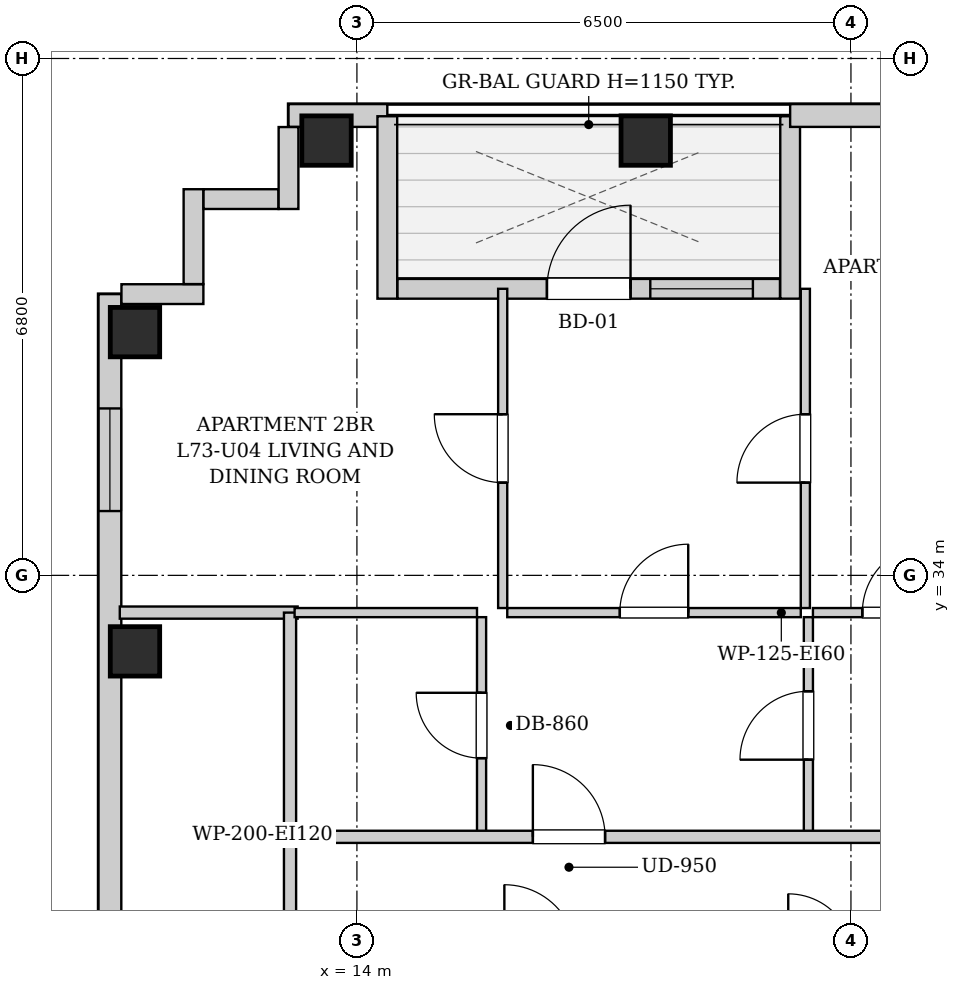
"""IFC4 building model, lengths in metres.
Left out: names, types, materials, properties, quantities, classifications, styles, units other than length and angle.
Written with IfcOpenShell. Run it as: python <this file> out.ifc"""

import sys

from ifc_helpers import new_model, si_unit, direction, frame, frame_2d, origin, origin_2d, place, context, subcontext, project, spatial, rectangle, extrude, element, fill, save


model = new_model("IFC4")
c1 = context("Model", 3, precision=1e-05, world=origin(), true_north=direction((0.0, 1.0)))
c2 = subcontext(c1, "Body", "Model", "MODEL_VIEW")
j1 = project(units=[si_unit("LENGTHUNIT", "METRE"), si_unit("PLANEANGLEUNIT", "RADIAN")], contexts=[c1])
p1 = place(None, origin())
s1 = spatial("IfcSite", under=j1, at=p1, CompositionType="ELEMENT")
p2 = place(p1, origin())
s2 = spatial("IfcBuilding", under=s1, at=p2, CompositionType="ELEMENT")
p3 = place(p2, frame((0.0, 0.0, 251.3)))
s3 = spatial("IfcBuildingStorey", under=s2, at=p3, CompositionType="ELEMENT", Elevation=251.3)
for number, where, z_axis, x_axis in (
    (1, (13.6, 39.72, 0.0), (0.0, 0.0, 1.0), (1.0, 0.0, 0.0)),
    (2, (17.8, 39.72, 0.0), (0.0, 0.0, 1.0), (1.0, 0.0, 0.0)),
    (3, (11.08, 33.0, 0.0), (0.0, 0.0, 1.0), (1.0, 0.0, 0.0)),
    (4, (11.08, 37.2, 0.0), (0.0, 0.0, 1.0), (1.0, 0.0, 0.0)),
):
    element("IfcColumn", number, at=place(p3, frame(where, z_axis=z_axis, x_axis=x_axis)), inside=s3, PredefinedType="COLUMN", context=c2, shape_type="SweptSolid", body=[
        extrude(rectangle(XDim=0.65, YDim=0.65, at=origin_2d()), origin(), (0.0, 0.0, 1.0), 3.4),
    ])
p4 = place(p3, frame((13.1, 40.05, 0.0), z_axis=(0.0, 0.0, 1.0), x_axis=(1.0, 0.0, 0.0)))
e5 = element("IfcWall", 5, at=p4, inside=s3, PredefinedType="SOLIDWALL", context=c2, shape_type="SweptSolid", body=[
    extrude(rectangle(XDim=1.3, YDim=0.3, at=frame_2d((0.65, 0.0))), origin(), (0.0, 0.0, 1.0), 3.14),
])
p5 = place(p3, frame((14.4, 40.04, 0.0), z_axis=(0.0, 0.0, 1.0), x_axis=(0.0, -1.0, 0.0)))
e6 = element("IfcWall", 6, at=p5, inside=s3, PredefinedType="SOLIDWALL", context=c2, shape_type="SweptSolid", body=[
    extrude(rectangle(XDim=2.4, YDim=0.26, at=frame_2d((1.2, 0.0))), origin(), (0.0, 0.0, 1.0), 3.14),
])
p6 = place(p3, frame((14.534, 37.77, 0.0), z_axis=(0.0, 0.0, 1.0), x_axis=(1.0, 0.0, 0.0)))
e7 = element("IfcWall", 7, at=p6, inside=s3, PredefinedType="SOLIDWALL", context=c2, shape_type="SweptSolid", body=[
    extrude(rectangle(XDim=5.032, YDim=0.26, at=frame_2d((2.516, 0.0))), origin(), (0.0, 0.0, 1.0), 3.14),
])
p7 = place(p6, frame((1.966, 0.0, 0.0)))
e8 = element("IfcOpeningElement", 8, at=p7, cuts=e7, PredefinedType="OPENING", context=c2, shape_type="SweptSolid", body=[
    extrude(rectangle(XDim=1.1, YDim=2.0, at=frame_2d((0.55, 1.0))), frame((0.0, 0.14, 0.0), z_axis=(0.0, -1.0, 0.0), x_axis=(1.0, 0.0, 0.0)), (0.0, 0.0, 1.0), 0.28),
])
p8 = place(p6, frame((3.326, 0.0, 0.55)))
e9 = element("IfcOpeningElement", 9, at=p8, cuts=e7, PredefinedType="OPENING", context=c2, shape_type="SweptSolid", body=[
    extrude(rectangle(XDim=1.35, YDim=1.2, at=frame_2d((0.675, 0.6))), frame((0.0, 0.14, 0.0), z_axis=(0.0, -1.0, 0.0), x_axis=(1.0, 0.0, 0.0)), (0.0, 0.0, 1.0), 0.28),
])
p9 = place(p3, frame((19.7, 37.64, 0.0), z_axis=(0.0, 0.0, 1.0), x_axis=(0.0, 1.0, 0.0)))
e10 = element("IfcWall", 10, at=p9, inside=s3, PredefinedType="SOLIDWALL", context=c2, shape_type="SweptSolid", body=[
    extrude(rectangle(XDim=2.4, YDim=0.26, at=frame_2d((1.2, 0.0))), origin(), (0.0, 0.0, 1.0), 3.14),
])
p10 = place(p3, frame((19.7, 40.05, 0.0), z_axis=(0.0, 0.0, 1.0), x_axis=(1.0, 0.0, 0.0)))
e11 = element("IfcWall", 11, at=p10, inside=s3, PredefinedType="SOLIDWALL", context=c2, shape_type="SweptSolid", body=[
    extrude(rectangle(XDim=10.25, YDim=0.3, at=frame_2d((5.125, 0.0))), origin(), (0.0, 0.0, 1.0), 3.14),
])
p11 = place(p10, frame((1.45, 0.0, 0.55)))
e12 = element("IfcOpeningElement", 12, at=p11, cuts=e11, PredefinedType="OPENING", context=c2, shape_type="SweptSolid", body=[
    extrude(rectangle(XDim=1.35, YDim=1.2, at=frame_2d((0.675, 0.6))), frame((0.0, 0.16, 0.0), z_axis=(0.0, -1.0, 0.0), x_axis=(1.0, 0.0, 0.0)), (0.0, 0.0, 1.0), 0.32),
])
p12 = place(p10, frame((7.8, 0.0, 0.55)))
e13 = element("IfcOpeningElement", 13, at=p12, cuts=e11, PredefinedType="OPENING", context=c2, shape_type="SweptSolid", body=[
    extrude(rectangle(XDim=1.35, YDim=1.2, at=frame_2d((0.675, 0.6))), frame((0.0, 0.16, 0.0), z_axis=(0.0, -1.0, 0.0), x_axis=(1.0, 0.0, 0.0)), (0.0, 0.0, 1.0), 0.32),
])
p13 = place(p3, frame((10.75, 6.3, 0.0), z_axis=(0.0, 0.0, 1.0), x_axis=(0.0, 1.0, 0.0)))
e14 = element("IfcWall", 14, at=p13, inside=s3, PredefinedType="SOLIDWALL", context=c2, shape_type="SweptSolid", body=[
    extrude(rectangle(XDim=31.4, YDim=0.3, at=frame_2d((15.7, 0.0))), origin(), (0.0, 0.0, 1.0), 3.14),
])
p14 = place(p13, frame((28.546, 0.0, 0.55)))
e15 = element("IfcOpeningElement", 15, at=p14, cuts=e14, PredefinedType="OPENING", context=c2, shape_type="SweptSolid", body=[
    extrude(rectangle(XDim=1.35, YDim=1.2, at=frame_2d((0.675, 0.6))), frame((0.0, 0.16, 0.0), z_axis=(0.0, -1.0, 0.0), x_axis=(1.0, 0.0, 0.0)), (0.0, 0.0, 1.0), 0.32),
])
p15 = place(p13, frame((11.85, 0.0, 0.55)))
e16 = element("IfcOpeningElement", 16, at=p15, cuts=e14, PredefinedType="OPENING", context=c2, shape_type="SweptSolid", body=[
    extrude(rectangle(XDim=1.35, YDim=1.2, at=frame_2d((0.675, 0.6))), frame((0.0, 0.16, 0.0), z_axis=(0.0, -1.0, 0.0), x_axis=(1.0, 0.0, 0.0)), (0.0, 0.0, 1.0), 0.32),
])
p16 = place(p13, frame((9.185, 0.0, 0.55)))
e17 = element("IfcOpeningElement", 17, at=p16, cuts=e14, PredefinedType="OPENING", context=c2, shape_type="SweptSolid", body=[
    extrude(rectangle(XDim=1.35, YDim=1.2, at=frame_2d((0.675, 0.6))), frame((0.0, 0.16, 0.0), z_axis=(0.0, -1.0, 0.0), x_axis=(1.0, 0.0, 0.0)), (0.0, 0.0, 1.0), 0.32),
])
p17 = place(p13, frame((19.006, 0.0, 0.55)))
e18 = element("IfcOpeningElement", 18, at=p17, cuts=e14, PredefinedType="OPENING", context=c2, shape_type="SweptSolid", body=[
    extrude(rectangle(XDim=1.35, YDim=1.2, at=frame_2d((0.675, 0.6))), frame((0.0, 0.16, 0.0), z_axis=(0.0, -1.0, 0.0), x_axis=(1.0, 0.0, 0.0)), (0.0, 0.0, 1.0), 0.32),
])
p18 = place(p13, frame((20.616, 0.0, 0.55)))
e19 = element("IfcOpeningElement", 19, at=p18, cuts=e14, PredefinedType="OPENING", context=c2, shape_type="SweptSolid", body=[
    extrude(rectangle(XDim=1.35, YDim=1.2, at=frame_2d((0.675, 0.6))), frame((0.0, 0.16, 0.0), z_axis=(0.0, -1.0, 0.0), x_axis=(1.0, 0.0, 0.0)), (0.0, 0.0, 1.0), 0.32),
])
p19 = place(p3, frame((10.902, 37.7, 0.0), z_axis=(0.0, 0.0, 1.0), x_axis=(1.0, 0.0, 0.0)))
e20 = element("IfcWall", 20, at=p19, inside=s3, PredefinedType="SOLIDWALL", context=c2, shape_type="SweptSolid", body=[
    extrude(rectangle(XDim=1.078, YDim=0.26, at=frame_2d((0.539, 0.0))), origin(), (0.0, 0.0, 1.0), 3.14),
])
p20 = place(p3, frame((11.85, 37.832, 0.0), z_axis=(0.0, 0.0, 1.0), x_axis=(0.0, 1.0, 0.0)))
e21 = element("IfcWall", 21, at=p20, inside=s3, PredefinedType="SOLIDWALL", context=c2, shape_type="SweptSolid", body=[
    extrude(rectangle(XDim=1.248, YDim=0.26, at=frame_2d((0.624, 0.0))), origin(), (0.0, 0.0, 1.0), 3.14),
])
p21 = place(p3, frame((11.982, 38.95, 0.0), z_axis=(0.0, 0.0, 1.0), x_axis=(1.0, 0.0, 0.0)))
e22 = element("IfcWall", 22, at=p21, inside=s3, PredefinedType="SOLIDWALL", context=c2, shape_type="SweptSolid", body=[
    extrude(rectangle(XDim=0.986, YDim=0.26, at=frame_2d((0.493, 0.0))), origin(), (0.0, 0.0, 1.0), 3.14),
])
p22 = place(p3, frame((13.1, 38.82, 0.0), z_axis=(0.0, 0.0, 1.0), x_axis=(0.0, 1.0, 0.0)))
e23 = element("IfcWall", 23, at=p22, inside=s3, PredefinedType="SOLIDWALL", context=c2, shape_type="SweptSolid", body=[
    extrude(rectangle(XDim=1.078, YDim=0.26, at=frame_2d((0.539, 0.0))), origin(), (0.0, 0.0, 1.0), 3.14),
])
p23 = place(p3, frame((13.12, 28.98, 0.0), z_axis=(0.0, 0.0, 1.0), x_axis=(0.0, 1.0, 0.0)))
e24 = element("IfcWall", 24, at=p23, inside=s3, PredefinedType="PARTITIONING", context=c2, shape_type="SweptSolid", body=[
    extrude(rectangle(XDim=1.58, YDim=0.16, at=frame_2d((0.79, 0.0))), origin(), (0.0, 0.0, 1.0), 3.14),
])
p24 = place(p3, frame((10.88, 33.51, 0.0), z_axis=(0.0, 0.0, 1.0), x_axis=(1.0, 0.0, 0.0)))
e25 = element("IfcWall", 25, at=p24, inside=s3, PredefinedType="PARTITIONING", context=c2, shape_type="SweptSolid", body=[
    extrude(rectangle(XDim=2.34, YDim=0.16, at=frame_2d((1.17, 0.0))), origin(), (0.0, 0.0, 1.0), 3.14),
])
p25 = place(p3, frame((13.12, 30.6, 0.0), z_axis=(0.0, 0.0, 1.0), x_axis=(0.0, 1.0, 0.0)))
e26 = element("IfcWall", 26, at=p25, inside=s3, PredefinedType="PARTITIONING", context=c2, shape_type="SweptSolid", body=[
    extrude(rectangle(XDim=2.91, YDim=0.16, at=frame_2d((1.455, 0.0))), origin(), (0.0, 0.0, 1.0), 3.14),
])
p26 = place(p3, frame((15.64, 30.6, 0.0), z_axis=(0.0, 0.0, 1.0), x_axis=(0.0, 1.0, 0.0)))
e27 = element("IfcWall", 27, at=p26, inside=s3, PredefinedType="PARTITIONING", context=c2, shape_type="SweptSolid", body=[
    extrude(rectangle(XDim=2.85, YDim=0.12, at=frame_2d((1.425, 0.0))), origin(), (0.0, 0.0, 1.0), 3.14),
])
p27 = place(p26, frame((0.995, 0.0, 0.0)))
e28 = element("IfcOpeningElement", 28, at=p27, cuts=e27, PredefinedType="OPENING", context=c2, shape_type="SweptSolid", body=[
    extrude(rectangle(XDim=0.86, YDim=2.05, at=frame_2d((0.43, 1.025))), frame((0.0, 0.07, 0.0), z_axis=(0.0, -1.0, 0.0), x_axis=(1.0, 0.0, 0.0)), (0.0, 0.0, 1.0), 0.14),
])
p28 = place(p3, frame((13.18, 33.51, 0.0), z_axis=(0.0, 0.0, 1.0), x_axis=(1.0, 0.0, 0.0)))
e29 = element("IfcWall", 29, at=p28, inside=s3, PredefinedType="PARTITIONING", context=c2, shape_type="SweptSolid", body=[
    extrude(rectangle(XDim=2.4, YDim=0.12, at=frame_2d((1.2, 0.0))), origin(), (0.0, 0.0, 1.0), 3.14),
])
p29 = place(p3, frame((19.94, 30.6, 0.0), z_axis=(0.0, 0.0, 1.0), x_axis=(0.0, 1.0, 0.0)))
e30 = element("IfcWall", 30, at=p29, inside=s3, PredefinedType="PARTITIONING", context=c2, shape_type="SweptSolid", body=[
    extrude(rectangle(XDim=2.85, YDim=0.12, at=frame_2d((1.425, 0.0))), origin(), (0.0, 0.0, 1.0), 3.14),
])
p30 = place(p29, frame((0.975, 0.0, 0.0)))
e31 = element("IfcOpeningElement", 31, at=p30, cuts=e30, PredefinedType="OPENING", context=c2, shape_type="SweptSolid", body=[
    extrude(rectangle(XDim=0.9, YDim=2.05, at=frame_2d((0.45, 1.025))), frame((0.0, 0.07, 0.0), z_axis=(0.0, -1.0, 0.0), x_axis=(1.0, 0.0, 0.0)), (0.0, 0.0, 1.0), 0.14),
])
p31 = place(p3, frame((15.978, 33.51, 0.0), z_axis=(0.0, 0.0, 1.0), x_axis=(1.0, 0.0, 0.0)))
e32 = element("IfcWall", 32, at=p31, inside=s3, PredefinedType="PARTITIONING", context=c2, shape_type="SweptSolid", body=[
    extrude(rectangle(XDim=3.862, YDim=0.12, at=frame_2d((1.931, 0.0))), origin(), (0.0, 0.0, 1.0), 3.14),
])
p32 = place(p31, frame((1.481, 0.0, 0.0)))
e33 = element("IfcOpeningElement", 33, at=p32, cuts=e32, PredefinedType="OPENING", context=c2, shape_type="SweptSolid", body=[
    extrude(rectangle(XDim=0.9, YDim=2.05, at=frame_2d((0.45, 1.025))), frame((0.0, 0.07, 0.0), z_axis=(0.0, -1.0, 0.0), x_axis=(1.0, 0.0, 0.0)), (0.0, 0.0, 1.0), 0.14),
])
p33 = place(p3, frame((20.0, 33.51, 0.0), z_axis=(0.0, 0.0, 1.0), x_axis=(1.0, 0.0, 0.0)))
e34 = element("IfcWall", 34, at=p33, inside=s3, PredefinedType="PARTITIONING", context=c2, shape_type="SweptSolid", body=[
    extrude(rectangle(XDim=2.2, YDim=0.12, at=frame_2d((1.1, 0.0))), origin(), (0.0, 0.0, 1.0), 3.14),
])
p34 = place(p33, frame((0.65, 0.0, 0.0)))
e35 = element("IfcOpeningElement", 35, at=p34, cuts=e34, PredefinedType="OPENING", context=c2, shape_type="SweptSolid", body=[
    extrude(rectangle(XDim=0.9, YDim=2.05, at=frame_2d((0.45, 1.025))), frame((0.0, 0.07, 0.0), z_axis=(0.0, -1.0, 0.0), x_axis=(1.0, 0.0, 0.0)), (0.0, 0.0, 1.0), 0.14),
])
p35 = place(p3, frame((15.918, 33.57, 0.0), z_axis=(0.0, 0.0, 1.0), x_axis=(0.0, 1.0, 0.0)))
e36 = element("IfcWall", 36, at=p35, inside=s3, PredefinedType="PARTITIONING", context=c2, shape_type="SweptSolid", body=[
    extrude(rectangle(XDim=4.2, YDim=0.12, at=frame_2d((2.1, 0.0))), origin(), (0.0, 0.0, 1.0), 3.14),
])
p36 = place(p35, frame((1.65, 0.0, 0.0)))
e37 = element("IfcOpeningElement", 37, at=p36, cuts=e36, PredefinedType="OPENING", context=c2, shape_type="SweptSolid", body=[
    extrude(rectangle(XDim=0.9, YDim=2.05, at=frame_2d((0.45, 1.025))), frame((0.0, 0.07, 0.0), z_axis=(0.0, -1.0, 0.0), x_axis=(1.0, 0.0, 0.0)), (0.0, 0.0, 1.0), 0.14),
])
p37 = place(p3, frame((19.9, 33.57, 0.0), z_axis=(0.0, 0.0, 1.0), x_axis=(0.0, 1.0, 0.0)))
e38 = element("IfcWall", 38, at=p37, inside=s3, PredefinedType="PARTITIONING", context=c2, shape_type="SweptSolid", body=[
    extrude(rectangle(XDim=4.2, YDim=0.12, at=frame_2d((2.1, 0.0))), origin(), (0.0, 0.0, 1.0), 3.14),
])
p38 = place(p37, frame((1.65, 0.0, 0.0)))
e39 = element("IfcOpeningElement", 39, at=p38, cuts=e38, PredefinedType="OPENING", context=c2, shape_type="SweptSolid", body=[
    extrude(rectangle(XDim=0.9, YDim=2.05, at=frame_2d((0.45, 1.025))), frame((0.0, 0.07, 0.0), z_axis=(0.0, -1.0, 0.0), x_axis=(1.0, 0.0, 0.0)), (0.0, 0.0, 1.0), 0.14),
])
p39 = place(p3, frame((13.15, 30.56, 0.0), z_axis=(0.0, 0.0, 1.0), x_axis=(1.0, 0.0, 0.0)))
e40 = element("IfcWall", 40, at=p39, inside=s3, PredefinedType="PARTITIONING", context=c2, shape_type="SweptSolid", body=[
    extrude(rectangle(XDim=24.6, YDim=0.16, at=frame_2d((12.3, 0.0))), origin(), (0.0, 0.0, 1.0), 3.14),
])
p40 = place(p39, frame((3.165, 0.0, 0.0)))
e41 = element("IfcOpeningElement", 41, at=p40, cuts=e40, PredefinedType="OPENING", context=c2, shape_type="SweptSolid", body=[
    extrude(rectangle(XDim=0.95, YDim=2.1, at=frame_2d((0.475, 1.05))), frame((0.0, 0.09, 0.0), z_axis=(0.0, -1.0, 0.0), x_axis=(1.0, 0.0, 0.0)), (0.0, 0.0, 1.0), 0.18),
])
p41 = place(p39, frame((20.585, 0.0, 0.0)))
e42 = element("IfcOpeningElement", 42, at=p41, cuts=e40, PredefinedType="OPENING", context=c2, shape_type="SweptSolid", body=[
    extrude(rectangle(XDim=0.95, YDim=2.1, at=frame_2d((0.475, 1.05))), frame((0.0, 0.09, 0.0), z_axis=(0.0, -1.0, 0.0), x_axis=(1.0, 0.0, 0.0)), (0.0, 0.0, 1.0), 0.18),
])
p42 = place(p27, origin())
e43 = element("IfcDoor", 43, at=p42, inside=s3, OperationType="SINGLE_SWING_RIGHT", PredefinedType="DOOR", context=c2, shape_type="SweptSolid", body=[
    extrude(rectangle(XDim=0.86, YDim=2.05, at=frame_2d((0.43, 1.025))), frame((0.0, 0.025, 0.0), z_axis=(0.0, -1.0, 0.0), x_axis=(1.0, 0.0, 0.0)), (0.0, 0.0, 1.0), 0.05),
])
fill(e28, e43)
p43 = place(p30, origin())
e44 = element("IfcDoor", 44, at=p43, inside=s3, OperationType="SINGLE_SWING_LEFT", PredefinedType="DOOR", context=c2, shape_type="SweptSolid", body=[
    extrude(rectangle(XDim=0.9, YDim=2.05, at=frame_2d((0.45, 1.025))), frame((0.0, 0.025, 0.0), z_axis=(0.0, -1.0, 0.0), x_axis=(1.0, 0.0, 0.0)), (0.0, 0.0, 1.0), 0.05),
])
fill(e31, e44)
p44 = place(p32, origin())
e45 = element("IfcDoor", 45, at=p44, inside=s3, OperationType="SINGLE_SWING_RIGHT", PredefinedType="DOOR", context=c2, shape_type="SweptSolid", body=[
    extrude(rectangle(XDim=0.9, YDim=2.05, at=frame_2d((0.45, 1.025))), frame((0.0, 0.025, 0.0), z_axis=(0.0, -1.0, 0.0), x_axis=(1.0, 0.0, 0.0)), (0.0, 0.0, 1.0), 0.05),
])
fill(e33, e45)
p45 = place(p34, origin())
e46 = element("IfcDoor", 46, at=p45, inside=s3, OperationType="SINGLE_SWING_RIGHT", PredefinedType="DOOR", context=c2, shape_type="SweptSolid", body=[
    extrude(rectangle(XDim=0.9, YDim=2.05, at=frame_2d((0.45, 1.025))), frame((0.0, 0.025, 0.0), z_axis=(0.0, -1.0, 0.0), x_axis=(1.0, 0.0, 0.0)), (0.0, 0.0, 1.0), 0.05),
])
fill(e35, e46)
p46 = place(p36, origin())
e47 = element("IfcDoor", 47, at=p46, inside=s3, OperationType="SINGLE_SWING_RIGHT", PredefinedType="DOOR", context=c2, shape_type="SweptSolid", body=[
    extrude(rectangle(XDim=0.9, YDim=2.05, at=frame_2d((0.45, 1.025))), frame((0.0, 0.025, 0.0), z_axis=(0.0, -1.0, 0.0), x_axis=(1.0, 0.0, 0.0)), (0.0, 0.0, 1.0), 0.05),
])
fill(e37, e47)
p47 = place(p38, origin())
e48 = element("IfcDoor", 48, at=p47, inside=s3, OperationType="SINGLE_SWING_LEFT", PredefinedType="DOOR", context=c2, shape_type="SweptSolid", body=[
    extrude(rectangle(XDim=0.9, YDim=2.05, at=frame_2d((0.45, 1.025))), frame((0.0, 0.025, 0.0), z_axis=(0.0, -1.0, 0.0), x_axis=(1.0, 0.0, 0.0)), (0.0, 0.0, 1.0), 0.05),
])
fill(e39, e48)
p48 = place(p40, origin())
e49 = element("IfcDoor", 49, at=p48, inside=s3, OperationType="SINGLE_SWING_LEFT", PredefinedType="DOOR", context=c2, shape_type="SweptSolid", body=[
    extrude(rectangle(XDim=0.95, YDim=2.1, at=frame_2d((0.475, 1.05))), frame((0.0, 0.025, 0.0), z_axis=(0.0, -1.0, 0.0), x_axis=(1.0, 0.0, 0.0)), (0.0, 0.0, 1.0), 0.05),
])
fill(e41, e49)
p49 = place(p7, origin())
e50 = element("IfcDoor", 50, at=p49, inside=s3, OperationType="SINGLE_SWING_RIGHT", PredefinedType="DOOR", context=c2, shape_type="SweptSolid", body=[
    extrude(rectangle(XDim=1.1, YDim=2.0, at=frame_2d((0.55, 1.0))), frame((0.0, 0.025, 0.0), z_axis=(0.0, -1.0, 0.0), x_axis=(1.0, 0.0, 0.0)), (0.0, 0.0, 1.0), 0.05),
])
fill(e8, e50)
p50 = place(p14, origin())
e51 = element("IfcWindow", 51, at=p50, inside=s3, PartitioningType="SINGLE_PANEL", PredefinedType="WINDOW", context=c2, shape_type="SweptSolid", body=[
    extrude(rectangle(XDim=1.35, YDim=1.2, at=frame_2d((0.675, 0.6))), frame((0.0, 0.03, 0.0), z_axis=(0.0, -1.0, 0.0), x_axis=(1.0, 0.0, 0.0)), (0.0, 0.0, 1.0), 0.06),
])
fill(e15, e51)
p51 = place(p8, origin())
e52 = element("IfcWindow", 52, at=p51, inside=s3, PartitioningType="SINGLE_PANEL", PredefinedType="WINDOW", context=c2, shape_type="SweptSolid", body=[
    extrude(rectangle(XDim=1.35, YDim=1.2, at=frame_2d((0.675, 0.6))), frame((0.0, 0.03, 0.0), z_axis=(0.0, -1.0, 0.0), x_axis=(1.0, 0.0, 0.0)), (0.0, 0.0, 1.0), 0.06),
])
fill(e9, e52)
save(model, sys.argv[1])
